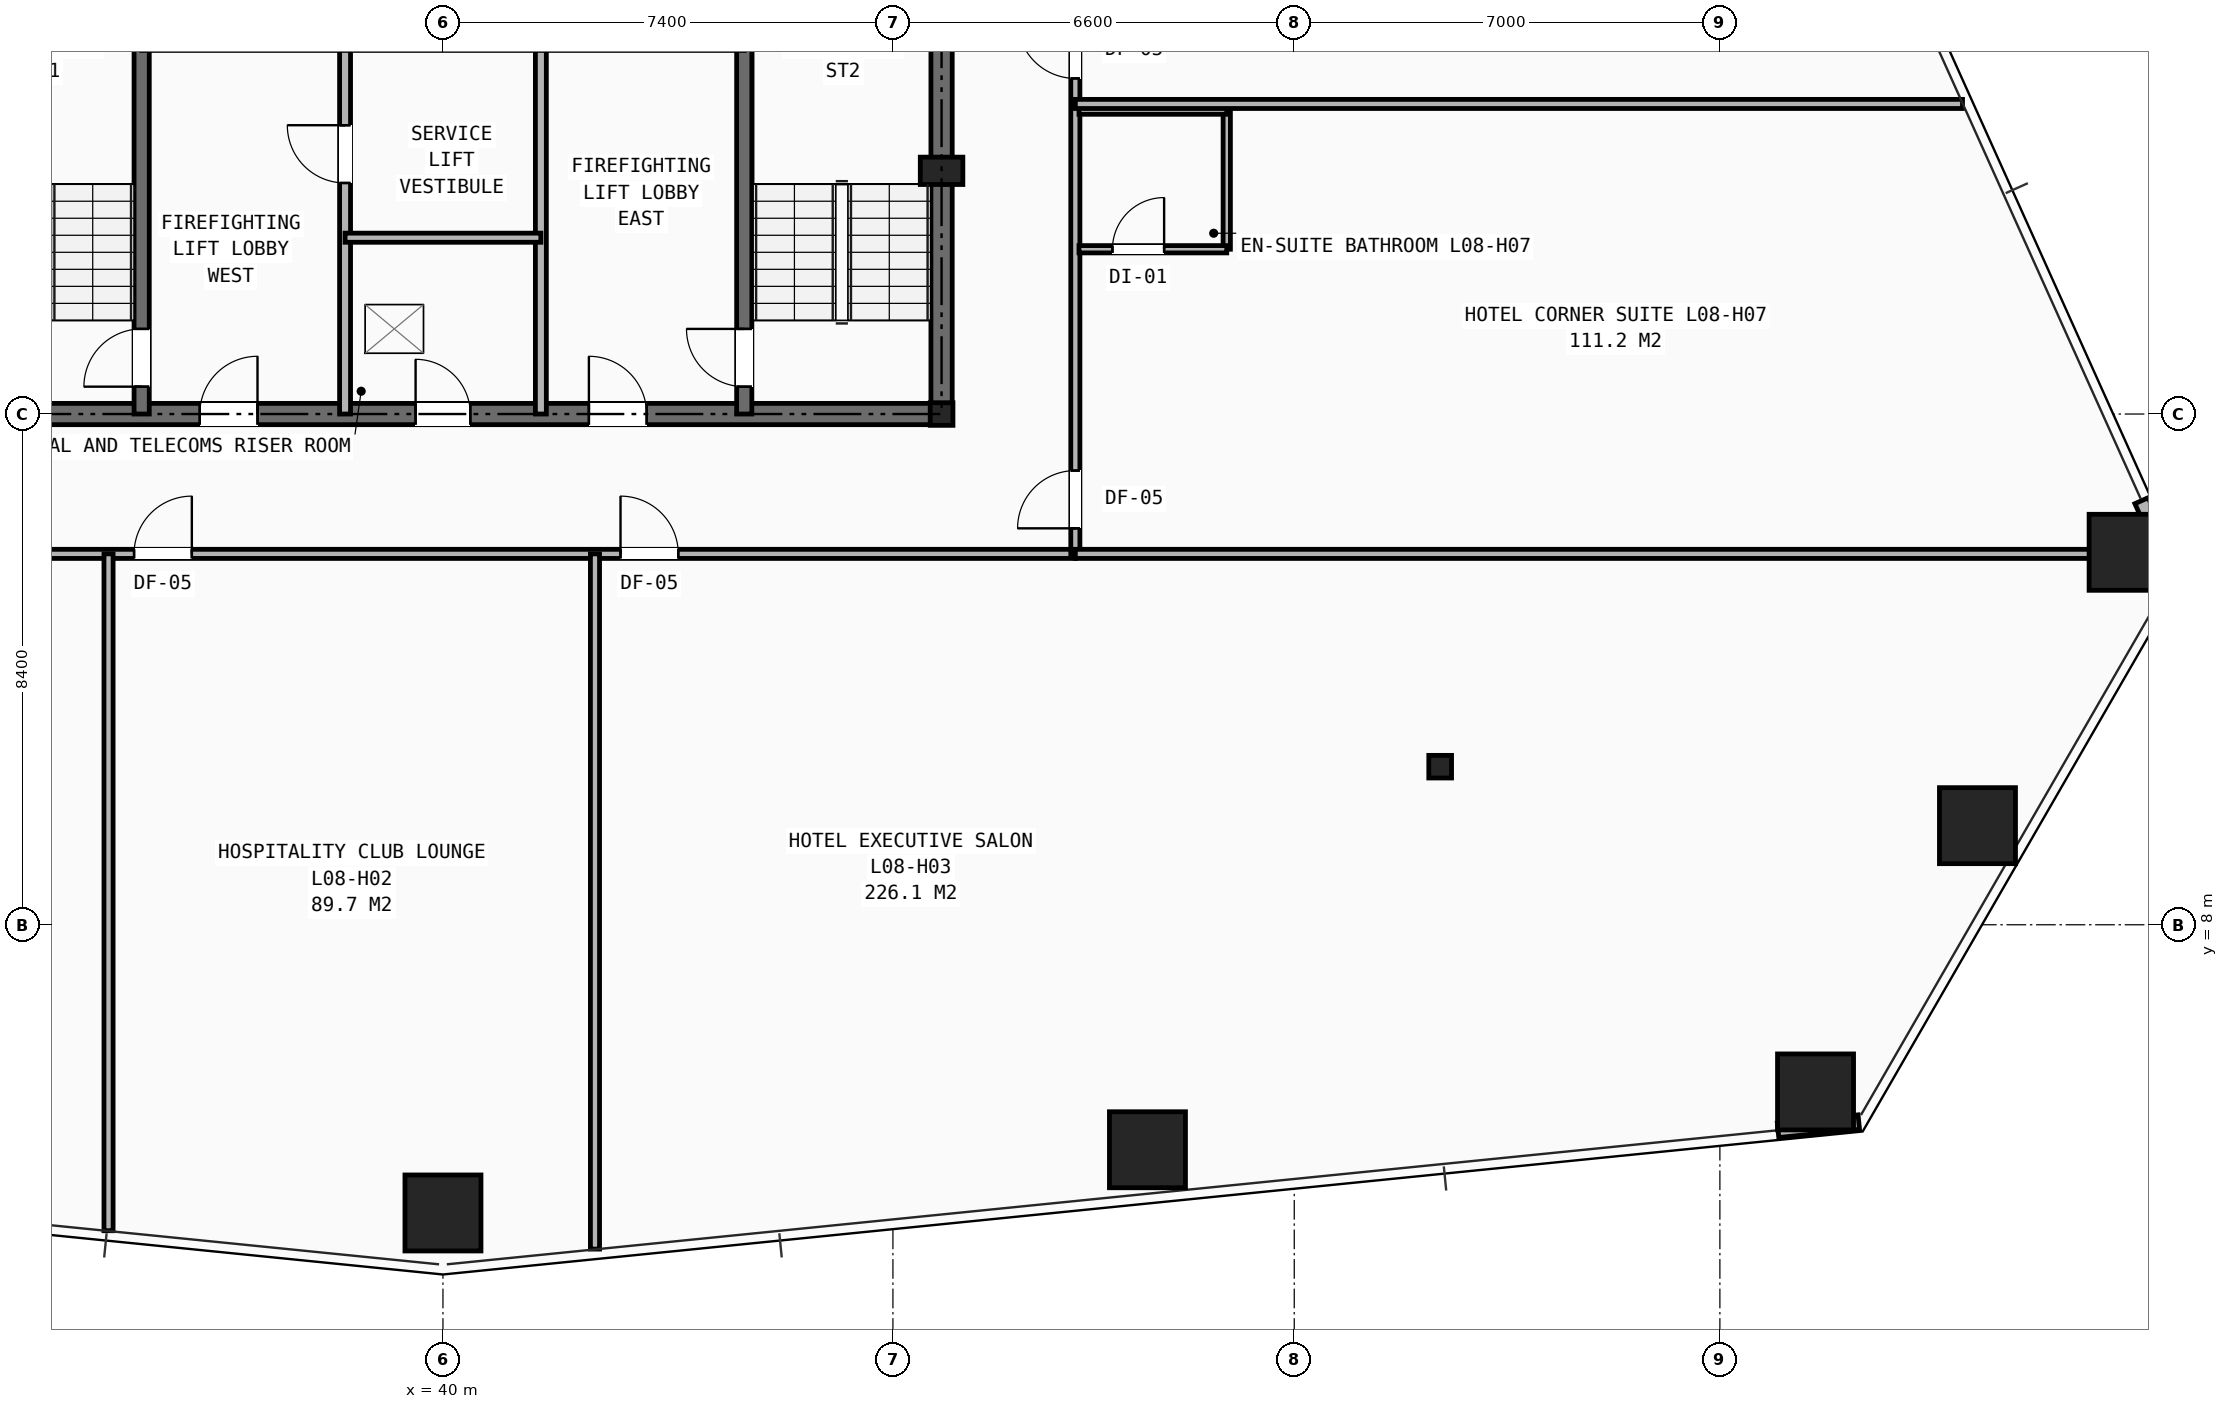
"""IFC4 building model, lengths in metres.
Left out: names, types, materials, properties, quantities, classifications, styles, units other than length and angle.
Written with IfcOpenShell. Run it as: python <this file> out.ifc"""

import sys

from ifc_helpers import new_model, si_unit, direction, frame, frame_2d, origin, origin_2d, place, context, subcontext, project, spatial, rectangle, hollow_rectangle, i_section, extrude, element, fill, save


model = new_model("IFC4")
c1 = context("Model", 3, precision=1e-05, world=origin(), true_north=direction((0.0, 1.0)))
c2 = subcontext(c1, "Body", "Model", "MODEL_VIEW")
j1 = project(units=[si_unit("LENGTHUNIT", "METRE"), si_unit("PLANEANGLEUNIT", "RADIAN")], contexts=[c1])
p1 = place(None, origin())
s1 = spatial("IfcSite", under=j1, at=p1, CompositionType="ELEMENT")
p2 = place(p1, origin())
s2 = spatial("IfcBuilding", under=s1, at=p2, CompositionType="ELEMENT")
p3 = place(p2, frame((0.0, 0.0, 33.6)))
s3 = spatial("IfcBuildingStorey", under=s2, at=p3, CompositionType="ELEMENT", Elevation=33.6)
for number, where, z_axis, x_axis in (
    (1, (48.2, 16.4, 0.0), (0.0, 0.0, 1.0), (1.0, 0.0, 0.0)),
    (2, (56.4, 10.6, 0.0), (0.0, 0.0, 1.0), (1.0, 0.0, 0.0)),
):
    element("IfcColumn", number, at=place(p3, frame(where, z_axis=z_axis, x_axis=x_axis)), inside=s3, PredefinedType="COLUMN", context=c2, shape_type="SweptSolid", body=[
        extrude(i_section(OverallWidth=0.374, OverallDepth=0.372, WebThickness=0.016, FlangeThickness=0.026, at=origin_2d()), origin(), (0.0, 0.0, 1.0), 3.2),
    ])
p4 = place(p3, frame((48.2, 20.4, 0.0), z_axis=(0.0, 0.0, 1.0), x_axis=(1.0, 0.0, 0.0)))
e3 = element("IfcColumn", 3, at=p4, inside=s3, PredefinedType="PILASTER", context=c2, shape_type="SweptSolid", body=[
    extrude(rectangle(XDim=0.7, YDim=0.45, at=origin_2d()), origin(), (0.0, 0.0, 1.0), 3.2),
])
for number, where, z_axis, x_axis in (
    (4, (40.0, 3.26, 0.0), (0.0, 0.0, 1.0), (1.0, 0.0, 0.0)),
    (5, (51.586, 4.3, 0.0), (0.0, 0.0, 1.0), (1.0, 0.0, 0.0)),
    (6, (62.573, 5.251, 0.0), (0.0, 0.0, 1.0), (1.0, 0.0, 0.0)),
    (7, (65.236, 9.63, 0.0), (0.0, 0.0, 1.0), (1.0, 0.0, 0.0)),
    (8, (67.697, 14.126, 0.0), (0.0, 0.0, 1.0), (1.0, 0.0, 0.0)),
):
    element("IfcColumn", number, at=place(p3, frame(where, z_axis=z_axis, x_axis=x_axis)), inside=s3, PredefinedType="COLUMN", context=c2, shape_type="SweptSolid", body=[
        extrude(hollow_rectangle(XDim=1.25, YDim=1.25, WallThickness=0.08, at=origin_2d()), origin(), (0.0, 0.0, 1.0), 3.2),
    ])
p5 = place(p3, frame((61.957, 4.621, 0.0), z_axis=(0.0, 0.0, 1.0), x_axis=(0.994962653924, 0.100246283205, 0.0)))
e9 = element("IfcWall", 9, at=p5, inside=s3, PredefinedType="SHEAR", context=c2, shape_type="SweptSolid", body=[
    extrude(rectangle(XDim=1.335, YDim=0.24, at=frame_2d((0.667, 0.0))), origin(), (0.0, 0.0, 1.0), 2.263),
])
p6 = place(p3, frame((68.483, 13.758, 0.0), z_axis=(0.0, 0.0, 1.0), x_axis=(-0.410767856127, 0.91173996752, 0.0)))
e10 = element("IfcWall", 10, at=p6, inside=s3, PredefinedType="SHEAR", context=c2, shape_type="SweptSolid", body=[
    extrude(rectangle(XDim=1.334, YDim=0.24, at=frame_2d((0.667, 0.0))), origin(), (0.0, 0.0, 1.0), 2.263),
])
p7 = place(p3, frame((31.8, 16.4, 0.0), z_axis=(0.0, 0.0, 1.0), x_axis=(1.0, 0.0, 0.0)))
e11 = element("IfcWall", 11, at=p7, inside=s3, PredefinedType="SHEAR", context=c2, shape_type="SweptSolid", body=[
    extrude(rectangle(XDim=16.4, YDim=0.35, at=frame_2d((8.2, 0.0))), origin(), (0.0, 0.0, 1.0), 2.98),
])
p8 = place(p7, frame((7.75, 0.0, 0.0)))
e12 = element("IfcOpeningElement", 12, at=p8, cuts=e11, PredefinedType="OPENING", context=c2, shape_type="SweptSolid", body=[
    extrude(rectangle(XDim=0.9, YDim=2.1, at=frame_2d((0.45, 1.05))), frame((0.0, 0.185, 0.0), z_axis=(0.0, -1.0, 0.0), x_axis=(1.0, 0.0, 0.0)), (0.0, 0.0, 1.0), 0.37),
])
p9 = place(p7, frame((4.2, 0.0, 0.0)))
e13 = element("IfcOpeningElement", 13, at=p9, cuts=e11, PredefinedType="OPENING", context=c2, shape_type="SweptSolid", body=[
    extrude(rectangle(XDim=0.95, YDim=2.1, at=frame_2d((0.475, 1.05))), frame((0.0, 0.185, 0.0), z_axis=(0.0, -1.0, 0.0), x_axis=(1.0, 0.0, 0.0)), (0.0, 0.0, 1.0), 0.37),
])
p10 = place(p7, frame((10.6, 0.0, 0.0)))
e14 = element("IfcOpeningElement", 14, at=p10, cuts=e11, PredefinedType="OPENING", context=c2, shape_type="SweptSolid", body=[
    extrude(rectangle(XDim=0.95, YDim=2.1, at=frame_2d((0.475, 1.05))), frame((0.0, 0.185, 0.0), z_axis=(0.0, -1.0, 0.0), x_axis=(1.0, 0.0, 0.0)), (0.0, 0.0, 1.0), 0.37),
])
p11 = place(p3, frame((48.2, 16.4, 0.0), z_axis=(0.0, 0.0, 1.0), x_axis=(0.0, 1.0, 0.0)))
e15 = element("IfcWall", 15, at=p11, inside=s3, PredefinedType="SHEAR", context=c2, shape_type="SweptSolid", body=[
    extrude(rectangle(XDim=14.8, YDim=0.35, at=frame_2d((7.4, 0.0))), origin(), (0.0, 0.0, 1.0), 2.98),
])
p12 = place(p11, frame((11.0, 0.0, 0.0)))
e16 = element("IfcOpeningElement", 16, at=p12, cuts=e15, PredefinedType="OPENING", context=c2, shape_type="SweptSolid", body=[
    extrude(rectangle(XDim=1.1, YDim=2.15, at=frame_2d((0.55, 1.075))), frame((0.0, 0.185, 0.0), z_axis=(0.0, -1.0, 0.0), x_axis=(1.0, 0.0, 0.0)), (0.0, 0.0, 1.0), 0.37),
])
p13 = place(p3, frame((35.045, 16.4, 0.0), z_axis=(0.0, 0.0, 1.0), x_axis=(0.0, 1.0, 0.0)))
e17 = element("IfcWall", 17, at=p13, inside=s3, PredefinedType="SHEAR", context=c2, shape_type="SweptSolid", body=[
    extrude(rectangle(XDim=8.4, YDim=0.25, at=frame_2d((4.2, 0.0))), origin(), (0.0, 0.0, 1.0), 2.98),
])
p14 = place(p13, frame((0.45, 0.0, 0.0)))
e18 = element("IfcOpeningElement", 18, at=p14, cuts=e17, PredefinedType="OPENING", context=c2, shape_type="SweptSolid", body=[
    extrude(rectangle(XDim=0.95, YDim=2.1, at=frame_2d((0.475, 1.05))), frame((0.0, 0.135, 0.0), z_axis=(0.0, -1.0, 0.0), x_axis=(1.0, 0.0, 0.0)), (0.0, 0.0, 1.0), 0.27),
])
p15 = place(p3, frame((44.955, 16.4, 0.0), z_axis=(0.0, 0.0, 1.0), x_axis=(0.0, 1.0, 0.0)))
e19 = element("IfcWall", 19, at=p15, inside=s3, PredefinedType="SHEAR", context=c2, shape_type="SweptSolid", body=[
    extrude(rectangle(XDim=8.4, YDim=0.25, at=frame_2d((4.2, 0.0))), origin(), (0.0, 0.0, 1.0), 2.98),
])
p16 = place(p15, frame((0.45, 0.0, 0.0)))
e20 = element("IfcOpeningElement", 20, at=p16, cuts=e19, PredefinedType="OPENING", context=c2, shape_type="SweptSolid", body=[
    extrude(rectangle(XDim=0.95, YDim=2.1, at=frame_2d((0.475, 1.05))), frame((0.0, 0.135, 0.0), z_axis=(0.0, -1.0, 0.0), x_axis=(1.0, 0.0, 0.0)), (0.0, 0.0, 1.0), 0.27),
])
p17 = place(p3, frame((38.39, 16.4, 0.0), z_axis=(0.0, 0.0, 1.0), x_axis=(0.0, 1.0, 0.0)))
e21 = element("IfcWall", 21, at=p17, inside=s3, PredefinedType="PARTITIONING", context=c2, shape_type="SweptSolid", body=[
    extrude(rectangle(XDim=8.4, YDim=0.18, at=frame_2d((4.2, 0.0))), origin(), (0.0, 0.0, 1.0), 2.431),
])
p18 = place(p17, frame((3.8, 0.0, 0.0)))
e22 = element("IfcOpeningElement", 22, at=p18, cuts=e21, PredefinedType="OPENING", context=c2, shape_type="SweptSolid", body=[
    extrude(rectangle(XDim=0.95, YDim=2.1, at=frame_2d((0.475, 1.05))), frame((0.0, 0.1, 0.0), z_axis=(0.0, -1.0, 0.0), x_axis=(1.0, 0.0, 0.0)), (0.0, 0.0, 1.0), 0.2),
])
p19 = place(p3, frame((41.61, 16.4, 0.0), z_axis=(0.0, 0.0, 1.0), x_axis=(0.0, 1.0, 0.0)))
e23 = element("IfcWall", 23, at=p19, inside=s3, PredefinedType="PARTITIONING", context=c2, shape_type="SweptSolid", body=[
    extrude(rectangle(XDim=8.4, YDim=0.18, at=frame_2d((4.2, 0.0))), origin(), (0.0, 0.0, 1.0), 2.431),
])
p20 = place(p3, frame((38.39, 19.3, 0.0), z_axis=(0.0, 0.0, 1.0), x_axis=(1.0, 0.0, 0.0)))
e24 = element("IfcWall", 24, at=p20, inside=s3, PredefinedType="PARTITIONING", context=c2, shape_type="SweptSolid", body=[
    extrude(rectangle(XDim=3.22, YDim=0.15, at=frame_2d((1.61, 0.0))), origin(), (0.0, 0.0, 1.0), 2.98),
])
p21 = place(p3, frame((29.6, 14.1, 0.0), z_axis=(0.0, 0.0, 1.0), x_axis=(1.0, 0.0, 0.0)))
e25 = element("IfcWall", 25, at=p21, inside=s3, PredefinedType="PARTITIONING", context=c2, shape_type="SweptSolid", body=[
    extrude(rectangle(XDim=20.8, YDim=0.15, at=frame_2d((10.4, 0.0))), origin(), (0.0, 0.0, 1.0), 2.191),
])
p22 = place(p21, frame((0.57, 0.0, 0.0)))
e26 = element("IfcOpeningElement", 26, at=p22, cuts=e25, PredefinedType="OPENING", context=c2, shape_type="SweptSolid", body=[
    extrude(rectangle(XDim=0.95, YDim=2.1, at=frame_2d((0.475, 1.05))), frame((0.0, 0.085, 0.0), z_axis=(0.0, -1.0, 0.0), x_axis=(1.0, 0.0, 0.0)), (0.0, 0.0, 1.0), 0.17),
])
p23 = place(p21, frame((5.32, 0.0, 0.0)))
e27 = element("IfcOpeningElement", 27, at=p23, cuts=e25, PredefinedType="OPENING", context=c2, shape_type="SweptSolid", body=[
    extrude(rectangle(XDim=0.95, YDim=2.1, at=frame_2d((0.475, 1.05))), frame((0.0, 0.085, 0.0), z_axis=(0.0, -1.0, 0.0), x_axis=(1.0, 0.0, 0.0)), (0.0, 0.0, 1.0), 0.17),
])
p24 = place(p21, frame((13.32, 0.0, 0.0)))
e28 = element("IfcOpeningElement", 28, at=p24, cuts=e25, PredefinedType="OPENING", context=c2, shape_type="SweptSolid", body=[
    extrude(rectangle(XDim=0.95, YDim=2.1, at=frame_2d((0.475, 1.05))), frame((0.0, 0.085, 0.0), z_axis=(0.0, -1.0, 0.0), x_axis=(1.0, 0.0, 0.0)), (0.0, 0.0, 1.0), 0.17),
])
p25 = place(p3, frame((50.4, 14.1, 0.0), z_axis=(0.0, 0.0, 1.0), x_axis=(0.0, 1.0, 0.0)))
e29 = element("IfcWall", 29, at=p25, inside=s3, PredefinedType="PARTITIONING", context=c2, shape_type="SweptSolid", body=[
    extrude(rectangle(XDim=21.9, YDim=0.15, at=frame_2d((10.95, 0.0))), origin(), (0.0, 0.0, 1.0), 2.191),
])
p26 = place(p25, frame((0.42, 0.0, 0.0)))
e30 = element("IfcOpeningElement", 30, at=p26, cuts=e29, PredefinedType="OPENING", context=c2, shape_type="SweptSolid", body=[
    extrude(rectangle(XDim=0.95, YDim=2.1, at=frame_2d((0.475, 1.05))), frame((0.0, 0.085, 0.0), z_axis=(0.0, -1.0, 0.0), x_axis=(1.0, 0.0, 0.0)), (0.0, 0.0, 1.0), 0.17),
])
p27 = place(p25, frame((7.82, 0.0, 0.0)))
e31 = element("IfcOpeningElement", 31, at=p27, cuts=e29, PredefinedType="OPENING", context=c2, shape_type="SweptSolid", body=[
    extrude(rectangle(XDim=0.95, YDim=2.1, at=frame_2d((0.475, 1.05))), frame((0.0, 0.085, 0.0), z_axis=(0.0, -1.0, 0.0), x_axis=(1.0, 0.0, 0.0)), (0.0, 0.0, 1.0), 0.17),
])
p28 = place(p25, frame((15.32, 0.0, 0.0)))
e32 = element("IfcOpeningElement", 32, at=p28, cuts=e29, PredefinedType="OPENING", context=c2, shape_type="SweptSolid", body=[
    extrude(rectangle(XDim=0.95, YDim=2.1, at=frame_2d((0.475, 1.05))), frame((0.0, 0.085, 0.0), z_axis=(0.0, -1.0, 0.0), x_axis=(1.0, 0.0, 0.0)), (0.0, 0.0, 1.0), 0.17),
])
p29 = place(p3, frame((34.5, 2.968, 0.0), z_axis=(0.0, 0.0, 1.0), x_axis=(0.0, 1.0, 0.0)))
e33 = element("IfcWall", 33, at=p29, inside=s3, PredefinedType="PARTITIONING", context=c2, shape_type="SweptSolid", body=[
    extrude(rectangle(XDim=11.132, YDim=0.15, at=frame_2d((5.566, 0.0))), origin(), (0.0, 0.0, 1.0), 2.191),
])
p30 = place(p3, frame((42.5, 2.666, 0.0), z_axis=(0.0, 0.0, 1.0), x_axis=(0.0, 1.0, 0.0)))
e34 = element("IfcWall", 34, at=p30, inside=s3, PredefinedType="PARTITIONING", context=c2, shape_type="SweptSolid", body=[
    extrude(rectangle(XDim=11.434, YDim=0.15, at=frame_2d((5.717, 0.0))), origin(), (0.0, 0.0, 1.0), 2.268),
])
p31 = place(p3, frame((50.4, 14.1, 0.0), z_axis=(0.0, 0.0, 1.0), x_axis=(1.0, 0.0, 0.0)))
e35 = element("IfcWall", 35, at=p31, inside=s3, PredefinedType="PARTITIONING", context=c2, shape_type="SweptSolid", body=[
    extrude(rectangle(XDim=17.923, YDim=0.15, at=frame_2d((8.961, 0.0))), origin(), (0.0, 0.0, 1.0), 2.191),
])
p32 = place(p3, frame((52.89, 19.11, 0.0), z_axis=(0.0, 0.0, 1.0), x_axis=(0.0, 1.0, 0.0)))
e36 = element("IfcWall", 36, at=p32, inside=s3, PredefinedType="PARTITIONING", context=c2, shape_type="SweptSolid", body=[
    extrude(rectangle(XDim=2.28, YDim=0.12, at=frame_2d((1.14, 0.0))), origin(), (0.0, 0.0, 1.0), 2.98),
])
p33 = place(p3, frame((50.46, 19.11, 0.0), z_axis=(0.0, 0.0, 1.0), x_axis=(1.0, 0.0, 0.0)))
e37 = element("IfcWall", 37, at=p33, inside=s3, PredefinedType="PARTITIONING", context=c2, shape_type="SweptSolid", body=[
    extrude(rectangle(XDim=2.43, YDim=0.12, at=frame_2d((1.215, 0.0))), origin(), (0.0, 0.0, 1.0), 2.98),
])
p34 = place(p33, frame((0.55, 0.0, 0.0)))
e38 = element("IfcOpeningElement", 38, at=p34, cuts=e37, PredefinedType="OPENING", context=c2, shape_type="SweptSolid", body=[
    extrude(rectangle(XDim=0.85, YDim=2.05, at=frame_2d((0.425, 1.025))), frame((0.0, 0.07, 0.0), z_axis=(0.0, -1.0, 0.0), x_axis=(1.0, 0.0, 0.0)), (0.0, 0.0, 1.0), 0.14),
])
p35 = place(p3, frame((50.46, 21.39, 0.0), z_axis=(0.0, 0.0, 1.0), x_axis=(1.0, 0.0, 0.0)))
e39 = element("IfcWall", 39, at=p35, inside=s3, PredefinedType="PARTITIONING", context=c2, shape_type="SweptSolid", body=[
    extrude(rectangle(XDim=2.43, YDim=0.12, at=frame_2d((1.215, 0.0))), origin(), (0.0, 0.0, 1.0), 2.98),
])
p36 = place(p3, frame((50.4, 21.5, 0.0), z_axis=(0.0, 0.0, 1.0), x_axis=(1.0, 0.0, 0.0)))
e40 = element("IfcWall", 40, at=p36, inside=s3, PredefinedType="PARTITIONING", context=c2, shape_type="SweptSolid", body=[
    extrude(rectangle(XDim=14.59, YDim=0.15, at=frame_2d((7.295, 0.0))), origin(), (0.0, 0.0, 1.0), 2.268),
])
p37 = place(p8, origin())
e41 = element("IfcDoor", 41, at=p37, inside=s3, OperationType="SINGLE_SWING_LEFT", PredefinedType="DOOR", context=c2, shape_type="SweptSolid", body=[
    extrude(rectangle(XDim=0.9, YDim=2.1, at=frame_2d((0.45, 1.05))), frame((0.0, 0.025, 0.0), z_axis=(0.0, -1.0, 0.0), x_axis=(1.0, 0.0, 0.0)), (0.0, 0.0, 1.0), 0.05),
])
fill(e12, e41)
p38 = place(p18, origin())
e42 = element("IfcDoor", 42, at=p38, inside=s3, OperationType="SINGLE_SWING_RIGHT", PredefinedType="DOOR", context=c2, shape_type="SweptSolid", body=[
    extrude(rectangle(XDim=0.95, YDim=2.1, at=frame_2d((0.475, 1.05))), frame((0.0, 0.025, 0.0), z_axis=(0.0, -1.0, 0.0), x_axis=(1.0, 0.0, 0.0)), (0.0, 0.0, 1.0), 0.05),
])
fill(e22, e42)
p39 = place(p14, origin())
e43 = element("IfcDoor", 43, at=p39, inside=s3, OperationType="SINGLE_SWING_LEFT", PredefinedType="DOOR", context=c2, shape_type="SweptSolid", body=[
    extrude(rectangle(XDim=0.95, YDim=2.1, at=frame_2d((0.475, 1.05))), frame((0.0, 0.025, 0.0), z_axis=(0.0, -1.0, 0.0), x_axis=(1.0, 0.0, 0.0)), (0.0, 0.0, 1.0), 0.05),
])
fill(e18, e43)
p40 = place(p16, origin())
e44 = element("IfcDoor", 44, at=p40, inside=s3, OperationType="SINGLE_SWING_RIGHT", PredefinedType="DOOR", context=c2, shape_type="SweptSolid", body=[
    extrude(rectangle(XDim=0.95, YDim=2.1, at=frame_2d((0.475, 1.05))), frame((0.0, 0.025, 0.0), z_axis=(0.0, -1.0, 0.0), x_axis=(1.0, 0.0, 0.0)), (0.0, 0.0, 1.0), 0.05),
])
fill(e20, e44)
p41 = place(p9, origin())
e45 = element("IfcDoor", 45, at=p41, inside=s3, OperationType="SINGLE_SWING_RIGHT", PredefinedType="DOOR", context=c2, shape_type="SweptSolid", body=[
    extrude(rectangle(XDim=0.95, YDim=2.1, at=frame_2d((0.475, 1.05))), frame((0.0, 0.025, 0.0), z_axis=(0.0, -1.0, 0.0), x_axis=(1.0, 0.0, 0.0)), (0.0, 0.0, 1.0), 0.05),
])
fill(e13, e45)
p42 = place(p10, origin())
e46 = element("IfcDoor", 46, at=p42, inside=s3, OperationType="SINGLE_SWING_LEFT", PredefinedType="DOOR", context=c2, shape_type="SweptSolid", body=[
    extrude(rectangle(XDim=0.95, YDim=2.1, at=frame_2d((0.475, 1.05))), frame((0.0, 0.025, 0.0), z_axis=(0.0, -1.0, 0.0), x_axis=(1.0, 0.0, 0.0)), (0.0, 0.0, 1.0), 0.05),
])
fill(e14, e46)
p43 = place(p23, origin())
e47 = element("IfcDoor", 47, at=p43, inside=s3, OperationType="SINGLE_SWING_RIGHT", PredefinedType="DOOR", context=c2, shape_type="SweptSolid", body=[
    extrude(rectangle(XDim=0.95, YDim=2.1, at=frame_2d((0.475, 1.05))), frame((0.0, 0.025, 0.0), z_axis=(0.0, -1.0, 0.0), x_axis=(1.0, 0.0, 0.0)), (0.0, 0.0, 1.0), 0.05),
])
fill(e27, e47)
p44 = place(p24, origin())
e48 = element("IfcDoor", 48, at=p44, inside=s3, OperationType="SINGLE_SWING_LEFT", PredefinedType="DOOR", context=c2, shape_type="SweptSolid", body=[
    extrude(rectangle(XDim=0.95, YDim=2.1, at=frame_2d((0.475, 1.05))), frame((0.0, 0.025, 0.0), z_axis=(0.0, -1.0, 0.0), x_axis=(1.0, 0.0, 0.0)), (0.0, 0.0, 1.0), 0.05),
])
fill(e28, e48)
p45 = place(p26, origin())
e49 = element("IfcDoor", 49, at=p45, inside=s3, OperationType="SINGLE_SWING_LEFT", PredefinedType="DOOR", context=c2, shape_type="SweptSolid", body=[
    extrude(rectangle(XDim=0.95, YDim=2.1, at=frame_2d((0.475, 1.05))), frame((0.0, 0.025, 0.0), z_axis=(0.0, -1.0, 0.0), x_axis=(1.0, 0.0, 0.0)), (0.0, 0.0, 1.0), 0.05),
])
fill(e30, e49)
p46 = place(p34, origin())
e50 = element("IfcDoor", 50, at=p46, inside=s3, OperationType="SINGLE_SWING_RIGHT", PredefinedType="DOOR", context=c2, shape_type="SweptSolid", body=[
    extrude(rectangle(XDim=0.85, YDim=2.05, at=frame_2d((0.425, 1.025))), frame((0.0, 0.025, 0.0), z_axis=(0.0, -1.0, 0.0), x_axis=(1.0, 0.0, 0.0)), (0.0, 0.0, 1.0), 0.05),
])
fill(e38, e50)
p47 = place(p27, origin())
e51 = element("IfcDoor", 51, at=p47, inside=s3, OperationType="SINGLE_SWING_RIGHT", PredefinedType="DOOR", context=c2, shape_type="SweptSolid", body=[
    extrude(rectangle(XDim=0.95, YDim=2.1, at=frame_2d((0.475, 1.05))), frame((0.0, 0.025, 0.0), z_axis=(0.0, -1.0, 0.0), x_axis=(1.0, 0.0, 0.0)), (0.0, 0.0, 1.0), 0.05),
])
fill(e31, e51)
save(model, sys.argv[1])
